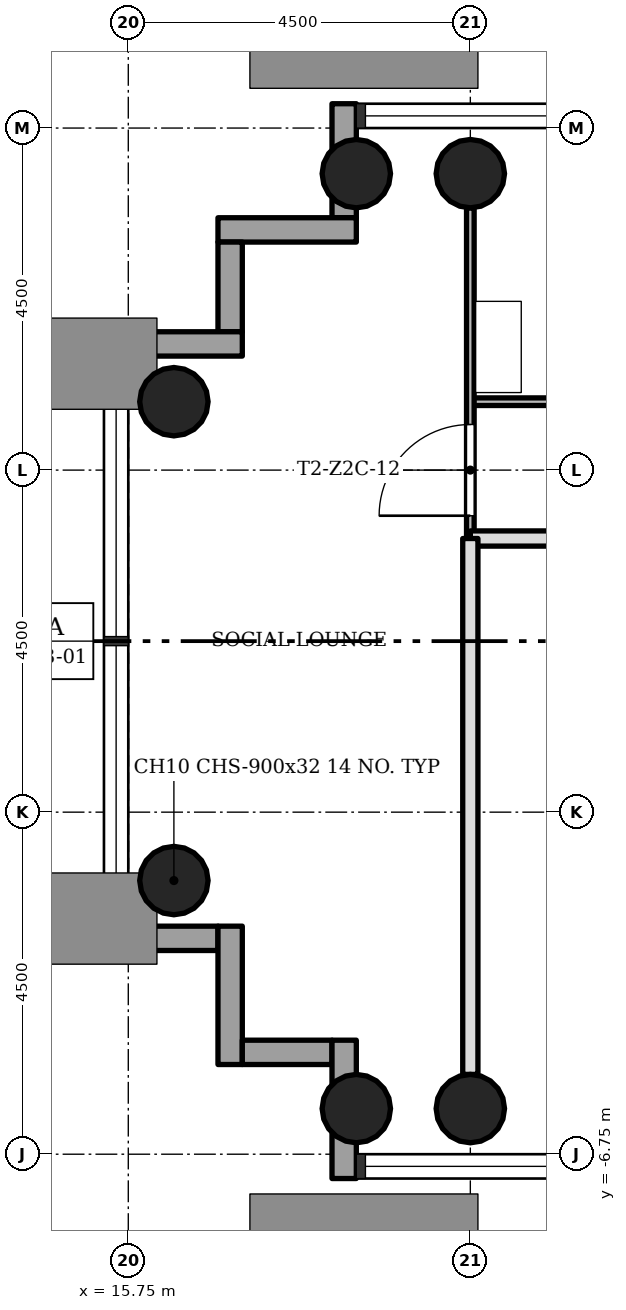
"""IFC4 building model, lengths in metres.
Left out: names, types, materials, properties, quantities, classifications, styles, units other than length and angle.
Written with IfcOpenShell. Run it as: python <this file> out.ifc"""

import sys

from ifc_helpers import new_model, si_unit, direction, frame, frame_2d, origin, origin_2d, place, context, subcontext, project, spatial, rectangle, hollow_circle, extrude, element, fill, save


model = new_model("IFC4")
c1 = context("Model", 3, precision=1e-05, world=origin(), true_north=direction((0.0, 1.0)))
c2 = subcontext(c1, "Body", "Model", "MODEL_VIEW")
j1 = project(units=[si_unit("LENGTHUNIT", "METRE"), si_unit("PLANEANGLEUNIT", "RADIAN")], contexts=[c1])
p1 = place(None, origin())
s1 = spatial("IfcSite", under=j1, at=p1, CompositionType="ELEMENT")
p2 = place(p1, origin())
s2 = spatial("IfcBuilding", under=s1, at=p2, CompositionType="ELEMENT")
p3 = place(p2, frame((0.0, 0.0, 93.6)))
s3 = spatial("IfcBuildingStorey", under=s2, at=p3, CompositionType="ELEMENT", Elevation=93.6)
for number, where, z_axis, x_axis in (
    (1, (20.25, 6.15, 0.0), (0.0, 0.0, 1.0), (1.0, 0.0, 0.0)),
    (2, (20.25, -6.15, 0.0), (0.0, 0.0, 1.0), (1.0, 0.0, 0.0)),
    (3, (18.75, 6.15, 0.0), (0.0, 0.0, 1.0), (1.0, 0.0, 0.0)),
    (4, (18.75, -6.15, 0.0), (0.0, 0.0, 1.0), (1.0, 0.0, 0.0)),
    (5, (16.35, 3.15, 0.0), (0.0, 0.0, 1.0), (1.0, 0.0, 0.0)),
    (6, (16.35, -3.15, 0.0), (0.0, 0.0, 1.0), (1.0, 0.0, 0.0)),
):
    element("IfcColumn", number, at=place(p3, frame(where, z_axis=z_axis, x_axis=x_axis)), inside=s3, PredefinedType="COLUMN", context=c2, shape_type="SweptSolid", body=[
        extrude(hollow_circle(Radius=0.45, WallThickness=0.032, at=origin_2d()), origin(), (0.0, 0.0, 1.0), 3.4),
    ])
p4 = place(p3, frame((18.59, 7.07, -0.3), z_axis=(0.0, 0.0, 1.0), x_axis=(0.0, -1.0, 0.0)))
e7 = element("IfcWall", 7, at=p4, inside=s3, PredefinedType="STANDARD", context=c2, shape_type="SweptSolid", body=[
    extrude(rectangle(XDim=1.5, YDim=0.32, at=frame_2d((0.75, 0.0))), origin(), (0.0, 0.0, 1.0), 3.4),
])
p5 = place(p3, frame((18.75, 5.41, -0.3), z_axis=(0.0, 0.0, 1.0), x_axis=(-1.0, 0.0, 0.0)))
e8 = element("IfcWall", 8, at=p5, inside=s3, PredefinedType="STANDARD", context=c2, shape_type="SweptSolid", body=[
    extrude(rectangle(XDim=1.82, YDim=0.32, at=frame_2d((0.91, 0.0))), origin(), (0.0, 0.0, 1.0), 3.4),
])
p6 = place(p3, frame((17.09, 5.25, -0.3), z_axis=(0.0, 0.0, 1.0), x_axis=(0.0, -1.0, 0.0)))
e9 = element("IfcWall", 9, at=p6, inside=s3, PredefinedType="STANDARD", context=c2, shape_type="SweptSolid", body=[
    extrude(rectangle(XDim=1.18, YDim=0.32, at=frame_2d((0.59, 0.0))), origin(), (0.0, 0.0, 1.0), 3.4),
])
p7 = place(p3, frame((17.25, 3.91, -0.3), z_axis=(0.0, 0.0, 1.0), x_axis=(-1.0, 0.0, 0.0)))
e10 = element("IfcWall", 10, at=p7, inside=s3, PredefinedType="STANDARD", context=c2, shape_type="SweptSolid", body=[
    extrude(rectangle(XDim=1.82, YDim=0.32, at=frame_2d((0.91, 0.0))), origin(), (0.0, 0.0, 1.0), 3.4),
])
p8 = place(p3, frame((15.43, -3.91, -0.3), z_axis=(0.0, 0.0, 1.0), x_axis=(1.0, 0.0, 0.0)))
e11 = element("IfcWall", 11, at=p8, inside=s3, PredefinedType="STANDARD", context=c2, shape_type="SweptSolid", body=[
    extrude(rectangle(XDim=1.5, YDim=0.32, at=frame_2d((0.75, 0.0))), origin(), (0.0, 0.0, 1.0), 3.4),
])
p9 = place(p3, frame((17.09, -3.75, -0.3), z_axis=(0.0, 0.0, 1.0), x_axis=(0.0, -1.0, 0.0)))
e12 = element("IfcWall", 12, at=p9, inside=s3, PredefinedType="STANDARD", context=c2, shape_type="SweptSolid", body=[
    extrude(rectangle(XDim=1.82, YDim=0.32, at=frame_2d((0.91, 0.0))), origin(), (0.0, 0.0, 1.0), 3.4),
])
p10 = place(p3, frame((17.25, -5.41, -0.3), z_axis=(0.0, 0.0, 1.0), x_axis=(1.0, 0.0, 0.0)))
e13 = element("IfcWall", 13, at=p10, inside=s3, PredefinedType="STANDARD", context=c2, shape_type="SweptSolid", body=[
    extrude(rectangle(XDim=1.18, YDim=0.32, at=frame_2d((0.59, 0.0))), origin(), (0.0, 0.0, 1.0), 3.4),
])
p11 = place(p3, frame((18.59, -5.25, -0.3), z_axis=(0.0, 0.0, 1.0), x_axis=(0.0, -1.0, 0.0)))
e14 = element("IfcWall", 14, at=p11, inside=s3, PredefinedType="STANDARD", context=c2, shape_type="SweptSolid", body=[
    extrude(rectangle(XDim=1.82, YDim=0.32, at=frame_2d((0.91, 0.0))), origin(), (0.0, 0.0, 1.0), 3.4),
])
p12 = place(p3, frame((27.45, 1.35, 0.0), z_axis=(0.0, 0.0, 1.0), x_axis=(-1.0, 0.0, 0.0)))
e15 = element("IfcWall", 15, at=p12, inside=s3, PredefinedType="SOLIDWALL", context=c2, shape_type="SweptSolid", body=[
    extrude(rectangle(XDim=7.2, YDim=0.2, at=frame_2d((3.6, 0.0))), origin(), (0.0, 0.0, 1.0), 3.0),
])
p13 = place(p12, frame((4.35, 0.0, 0.0)))
e16 = element("IfcOpeningElement", 16, at=p13, cuts=e15, PredefinedType="OPENING", context=c2, shape_type="SweptSolid", body=[
    extrude(rectangle(XDim=0.9, YDim=2.1, at=frame_2d((0.45, 1.05))), frame((0.0, 0.11, 0.0), z_axis=(0.0, -1.0, 0.0), x_axis=(1.0, 0.0, 0.0)), (0.0, 0.0, 1.0), 0.22),
])
p14 = place(p3, frame((29.25, 3.15, 0.0), z_axis=(0.0, 0.0, 1.0), x_axis=(-1.0, 0.0, 0.0)))
e17 = element("IfcWall", 17, at=p14, inside=s3, PredefinedType="PARTITIONING", context=c2, shape_type="SweptSolid", body=[
    extrude(rectangle(XDim=9.0, YDim=0.1, at=frame_2d((4.5, 0.0))), origin(), (0.0, 0.0, 1.0), 3.0),
])
p15 = place(p14, frame((2.55, 0.0, 0.0)))
e18 = element("IfcOpeningElement", 18, at=p15, cuts=e17, PredefinedType="OPENING", context=c2, shape_type="SweptSolid", body=[
    extrude(rectangle(XDim=0.9, YDim=2.1, at=frame_2d((0.45, 1.05))), frame((0.0, 0.06, 0.0), z_axis=(0.0, -1.0, 0.0), x_axis=(1.0, 0.0, 0.0)), (0.0, 0.0, 1.0), 0.12),
])
p16 = place(p3, frame((20.25, 1.35, 0.0), z_axis=(0.0, 0.0, 1.0), x_axis=(0.0, 1.0, 0.0)))
e19 = element("IfcWall", 19, at=p16, inside=s3, PredefinedType="PARTITIONING", context=c2, shape_type="SweptSolid", body=[
    extrude(rectangle(XDim=4.35, YDim=0.1, at=frame_2d((2.175, 0.0))), origin(), (0.0, 0.0, 1.0), 3.0),
])
p17 = place(p16, frame((0.3, 0.0, 0.0)))
e20 = element("IfcOpeningElement", 20, at=p17, cuts=e19, PredefinedType="OPENING", context=c2, shape_type="SweptSolid", body=[
    extrude(rectangle(XDim=1.2, YDim=2.1, at=frame_2d((0.6, 1.05))), frame((0.0, 0.06, 0.0), z_axis=(0.0, -1.0, 0.0), x_axis=(1.0, 0.0, 0.0)), (0.0, 0.0, 1.0), 0.12),
])
p18 = place(p3, frame((20.25, -5.7, 0.0), z_axis=(0.0, 0.0, 1.0), x_axis=(0.0, 1.0, 0.0)))
e21 = element("IfcWall", 21, at=p18, inside=s3, PredefinedType="SOLIDWALL", context=c2, shape_type="SweptSolid", body=[
    extrude(rectangle(XDim=7.05, YDim=0.2, at=frame_2d((3.525, 0.0))), origin(), (0.0, 0.0, 1.0), 3.0),
])
p19 = place(p17, origin())
e22 = element("IfcDoor", 22, at=p19, inside=s3, OperationType="SINGLE_SWING_RIGHT", PredefinedType="DOOR", context=c2, shape_type="SweptSolid", body=[
    extrude(rectangle(XDim=1.2, YDim=2.1, at=frame_2d((0.6, 1.05))), frame((0.0, 0.025, 0.0), z_axis=(0.0, -1.0, 0.0), x_axis=(1.0, 0.0, 0.0)), (0.0, 0.0, 1.0), 0.05),
])
fill(e20, e22)
save(model, sys.argv[1])
